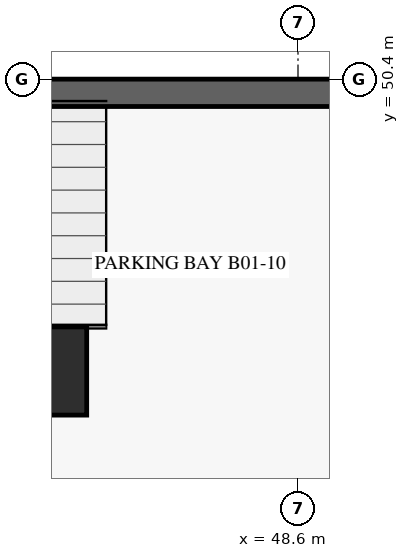
"""IFC4 building model, lengths in metres.
Left out: names, types, materials, properties, quantities, classifications, styles, units other than length and angle.
Written with IfcOpenShell. Run it as: python <this file> out.ifc"""

import sys

from ifc_helpers import new_model, si_unit, direction, frame, frame_2d, origin, origin_2d, place, context, subcontext, project, spatial, rectangle, extrude, source, transform, mapped, element, save


model = new_model("IFC4")
c1 = context("Model", 3, precision=1e-05, world=origin(), true_north=direction((0.0, 1.0)))
c2 = subcontext(c1, "Body", "Model", "MODEL_VIEW")
j1 = project(units=[si_unit("LENGTHUNIT", "METRE"), si_unit("PLANEANGLEUNIT", "RADIAN")], contexts=[c1])
p1 = place(None, origin())
s1 = spatial("IfcSite", under=j1, at=p1, CompositionType="ELEMENT")
p2 = place(p1, origin())
s2 = spatial("IfcBuilding", under=s1, at=p2, CompositionType="ELEMENT")
p3 = place(p2, frame((0.0, 0.0, -3.6)))
s3 = spatial("IfcBuildingStorey", under=s2, at=p3, CompositionType="ELEMENT", Elevation=-3.6)
p4 = place(p3, frame((64.575, 50.175, -0.36), z_axis=(0.0, 0.0, 1.0), x_axis=(-1.0, 0.0, 0.0)))
e1 = element("IfcWall", 1, at=p4, inside=s3, PredefinedType="USERDEFINED", context=c2, shape_type="SweptSolid", body=[
    extrude(rectangle(XDim=64.35, YDim=0.45, at=frame_2d((32.175, 0.0))), origin(), (0.0, 0.0, 1.0), 3.578),
])
m1 = source(origin(), c2, "Body", "SweptSolid", [
    extrude(rectangle(XDim=1.45, YDim=1.45, at=origin_2d()), origin(), (0.0, 0.0, 1.0), 3.58),
])
p5 = place(p3, frame((44.4, 45.6, -0.36), z_axis=(0.0, 0.0, 1.0), x_axis=(1.0, 0.0, 0.0)))
e2 = element("IfcColumn", 2, at=p5, inside=s3, PredefinedType="COLUMN", context=c2, shape_type="MappedRepresentation", body=[
    mapped(m1, transform((0.0, 0.0, 0.0), scale=1.0)),
])
save(model, sys.argv[1])
